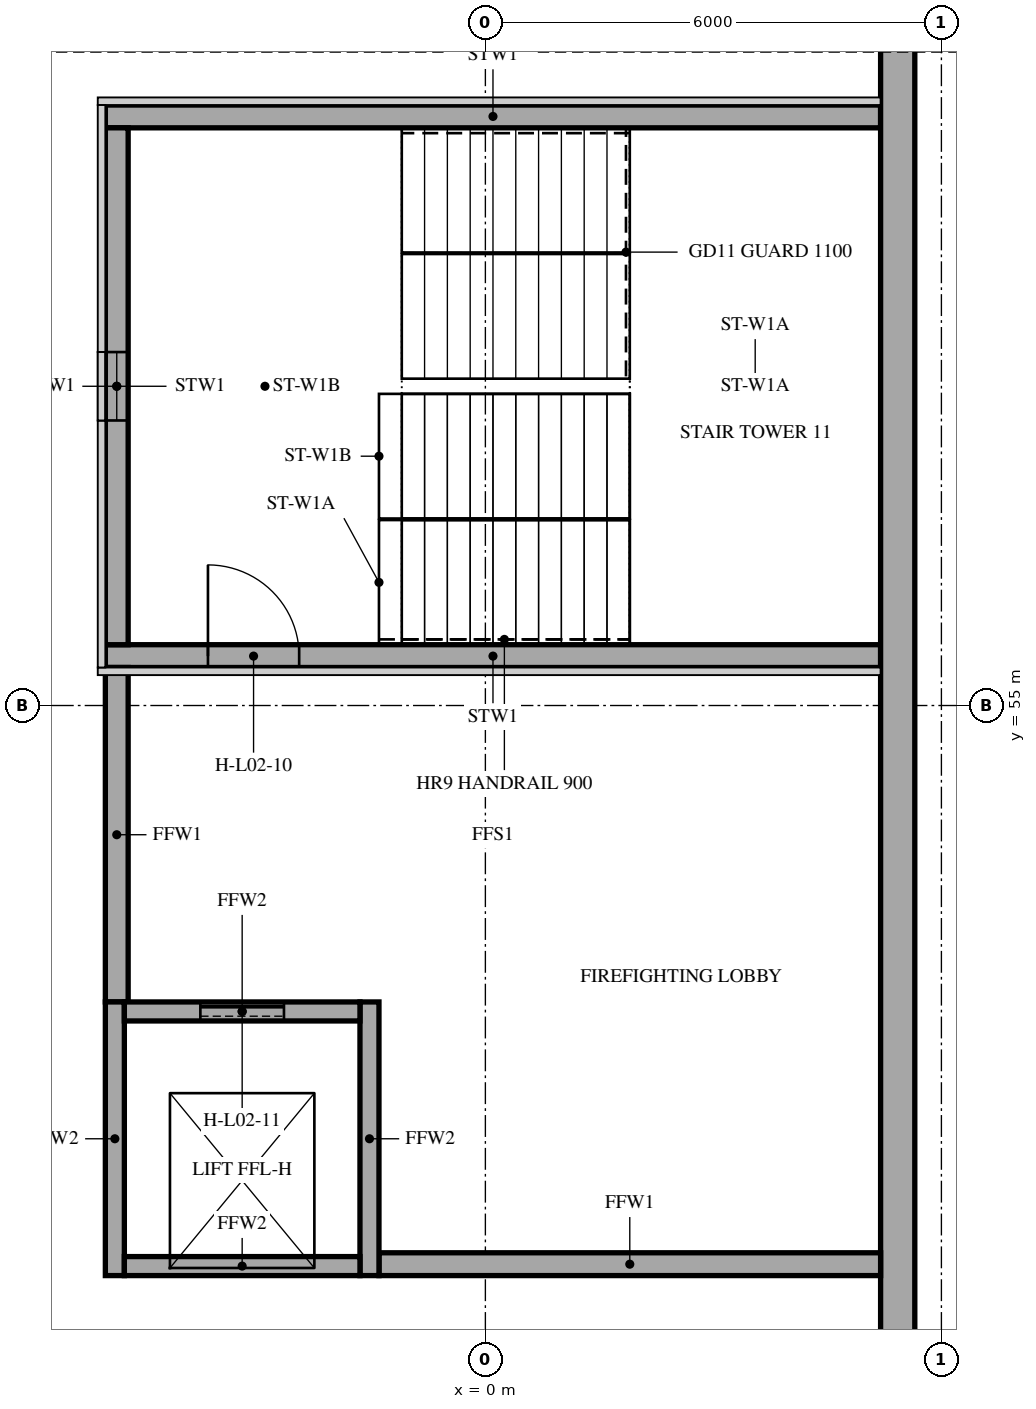
"""IFC4 building model, lengths in metres.
Left out: names, types, materials, properties, quantities, classifications, styles, units other than length and angle.
Written with IfcOpenShell. Run it as: python <this file> out.ifc"""

import sys

from ifc_helpers import new_model, si_unit, direction, frame, frame_2d, origin, place, context, subcontext, project, spatial, rectangle, extrude, element, fill, save


model = new_model("IFC4")
c1 = context("Model", 3, precision=1e-05, world=origin(), true_north=direction((0.0, 1.0)))
c2 = subcontext(c1, "Body", "Model", "MODEL_VIEW")
j1 = project(units=[si_unit("LENGTHUNIT", "METRE"), si_unit("PLANEANGLEUNIT", "RADIAN")], contexts=[c1])
p1 = place(None, origin())
s1 = spatial("IfcSite", under=j1, at=p1, CompositionType="ELEMENT")
p2 = place(p1, origin())
s2 = spatial("IfcBuilding", under=s1, at=p2, CompositionType="ELEMENT")
p3 = place(p2, frame((0.0, 0.0, 10.0)))
s3 = spatial("IfcBuildingStorey", under=s2, at=p3, CompositionType="ELEMENT", Elevation=10.0)
p4 = place(p3, frame((5.2, 55.65, 0.0), z_axis=(0.0, 0.0, 1.0), x_axis=(-1.0, 0.0, 0.0)))
e1 = element("IfcWall", 1, at=p4, inside=s3, PredefinedType="SHEAR", context=c2, shape_type="SweptSolid", body=[
    extrude(rectangle(XDim=10.2, YDim=0.3, at=frame_2d((5.1, 0.0))), origin(), (0.0, 0.0, 1.0), 5.0),
])
p5 = place(p4, frame((7.65, 0.0, 0.0)))
e2 = element("IfcOpeningElement", 2, at=p5, cuts=e1, PredefinedType="OPENING", context=c2, shape_type="SweptSolid", body=[
    extrude(rectangle(XDim=1.2, YDim=2.1, at=frame_2d((0.6, 1.05))), frame((0.0, 0.16, 0.0), z_axis=(0.0, -1.0, 0.0), x_axis=(1.0, 0.0, 0.0)), (0.0, 0.0, 1.0), 0.32),
])
p6 = place(p3, frame((5.2, 62.75, 0.0), z_axis=(0.0, 0.0, 1.0), x_axis=(-1.0, 0.0, 0.0)))
e3 = element("IfcWall", 3, at=p6, inside=s3, PredefinedType="SHEAR", context=c2, shape_type="SweptSolid", body=[
    extrude(rectangle(XDim=10.2, YDim=0.3, at=frame_2d((5.1, 0.0))), origin(), (0.0, 0.0, 1.0), 5.0),
])
p7 = place(p3, frame((-4.85, 55.8, 0.0), z_axis=(0.0, 0.0, 1.0), x_axis=(0.0, 1.0, 0.0)))
e4 = element("IfcWall", 4, at=p7, inside=s3, PredefinedType="SHEAR", context=c2, shape_type="SweptSolid", body=[
    extrude(rectangle(XDim=6.8, YDim=0.3, at=frame_2d((3.4, 0.0))), origin(), (0.0, 0.0, 1.0), 5.0),
])
p8 = place(p7, frame((2.95, 0.0, 0.9)))
e5 = element("IfcOpeningElement", 5, at=p8, cuts=e4, PredefinedType="OPENING", context=c2, shape_type="SweptSolid", body=[
    extrude(rectangle(XDim=0.9, YDim=1.5, at=frame_2d((0.45, 0.75))), frame((0.0, 0.16, 0.0), z_axis=(0.0, -1.0, 0.0), x_axis=(1.0, 0.0, 0.0)), (0.0, 0.0, 1.0), 0.32),
])
p9 = place(p3, frame((5.425, 46.75, 0.0), z_axis=(0.0, 0.0, 1.0), x_axis=(0.0, 1.0, 0.0)))
e6 = element("IfcWall", 6, at=p9, inside=s3, PredefinedType="SOLIDWALL", context=c2, shape_type="SweptSolid", body=[
    extrude(rectangle(XDim=61.65, YDim=0.45, at=frame_2d((30.825, 0.0))), origin(), (0.0, 0.0, 1.0), 5.0),
])
p10 = place(p9, frame((45.75, 0.0, 0.0)))
e7 = element("IfcOpeningElement", 7, at=p10, cuts=e6, PredefinedType="OPENING", context=c2, shape_type="SweptSolid", body=[
    extrude(rectangle(XDim=6.0, YDim=0.6, at=frame_2d((3.0, 0.3))), frame((0.0, 0.235, 0.0), z_axis=(0.0, -1.0, 0.0), x_axis=(1.0, 0.0, 0.0)), (0.0, 0.0, 1.0), 0.47),
])
p11 = place(p9, frame((54.75, 0.0, 0.0)))
e8 = element("IfcOpeningElement", 8, at=p11, cuts=e6, PredefinedType="OPENING", context=c2, shape_type="SweptSolid", body=[
    extrude(rectangle(XDim=6.0, YDim=0.6, at=frame_2d((3.0, 0.3))), frame((0.0, 0.235, 0.0), z_axis=(0.0, -1.0, 0.0), x_axis=(1.0, 0.0, 0.0)), (0.0, 0.0, 1.0), 0.47),
])
p12 = place(p3, frame((-4.85, 51.1, 0.0), z_axis=(0.0, 0.0, 1.0), x_axis=(0.0, 1.0, 0.0)))
e9 = element("IfcWall", 9, at=p12, inside=s3, PredefinedType="SHEAR", context=c2, shape_type="SweptSolid", body=[
    extrude(rectangle(XDim=4.4, YDim=0.3, at=frame_2d((2.2, 0.0))), origin(), (0.0, 0.0, 1.0), 4.75),
])
p13 = place(p3, frame((-1.4, 47.65, 0.0), z_axis=(0.0, 0.0, 1.0), x_axis=(1.0, 0.0, 0.0)))
e10 = element("IfcWall", 10, at=p13, inside=s3, PredefinedType="SHEAR", context=c2, shape_type="SweptSolid", body=[
    extrude(rectangle(XDim=6.6, YDim=0.3, at=frame_2d((3.3, 0.0))), origin(), (0.0, 0.0, 1.0), 4.75),
])
for number, where, z_axis, x_axis in (
    (11, (-4.875, 47.5, 0.0), (0.0, 0.0, 1.0), (0.0, 1.0, 0.0)),
    (12, (-1.525, 47.5, 0.0), (0.0, 0.0, 1.0), (0.0, 1.0, 0.0)),
):
    element("IfcWall", number, at=place(p3, frame(where, z_axis=z_axis, x_axis=x_axis)), inside=s3, PredefinedType="SHEAR", context=c2, shape_type="SweptSolid", body=[
        extrude(rectangle(XDim=3.6, YDim=0.25, at=frame_2d((1.8, 0.0))), origin(), (0.0, 0.0, 1.0), 5.0),
    ])
p14 = place(p3, frame((-4.75, 50.975, 0.0), z_axis=(0.0, 0.0, 1.0), x_axis=(1.0, 0.0, 0.0)))
e13 = element("IfcWall", 13, at=p14, inside=s3, PredefinedType="SHEAR", context=c2, shape_type="SweptSolid", body=[
    extrude(rectangle(XDim=3.1, YDim=0.25, at=frame_2d((1.55, 0.0))), origin(), (0.0, 0.0, 1.0), 5.0),
])
p15 = place(p14, frame((1.0, 0.0, 0.0)))
e14 = element("IfcOpeningElement", 14, at=p15, cuts=e13, PredefinedType="OPENING", context=c2, shape_type="SweptSolid", body=[
    extrude(rectangle(XDim=1.1, YDim=2.1, at=frame_2d((0.55, 1.05))), frame((0.0, 0.135, 0.0), z_axis=(0.0, -1.0, 0.0), x_axis=(1.0, 0.0, 0.0)), (0.0, 0.0, 1.0), 0.27),
])
p16 = place(p3, frame((-4.75, 47.625, 0.0), z_axis=(0.0, 0.0, 1.0), x_axis=(1.0, 0.0, 0.0)))
e15 = element("IfcWall", 15, at=p16, inside=s3, PredefinedType="SHEAR", context=c2, shape_type="SweptSolid", body=[
    extrude(rectangle(XDim=3.1, YDim=0.25, at=frame_2d((1.55, 0.0))), origin(), (0.0, 0.0, 1.0), 5.0),
])
p17 = place(p8, origin())
e16 = element("IfcWindow", 16, at=p17, inside=s3, PartitioningType="SINGLE_PANEL", PredefinedType="WINDOW", context=c2, shape_type="SweptSolid", body=[
    extrude(rectangle(XDim=0.9, YDim=1.5, at=frame_2d((0.45, 0.75))), frame((0.0, 0.03, 0.0), z_axis=(0.0, -1.0, 0.0), x_axis=(1.0, 0.0, 0.0)), (0.0, 0.0, 1.0), 0.06),
])
fill(e5, e16)
p18 = place(p5, frame((1.2, 0.0, 0.0), z_axis=(0.0, 0.0, 1.0), x_axis=(-1.0, 0.0, 0.0)))
e17 = element("IfcDoor", 17, at=p18, inside=s3, OperationType="SINGLE_SWING_LEFT", PredefinedType="DOOR", context=c2, shape_type="SweptSolid", body=[
    extrude(rectangle(XDim=1.2, YDim=2.1, at=frame_2d((0.6, 1.05))), frame((0.0, 0.025, 0.0), z_axis=(0.0, -1.0, 0.0), x_axis=(1.0, 0.0, 0.0)), (0.0, 0.0, 1.0), 0.05),
])
fill(e2, e17)
p19 = place(p15, origin())
e18 = element("IfcDoor", 18, at=p19, inside=s3, OperationType="SLIDING_TO_LEFT", PredefinedType="DOOR", context=c2, shape_type="SweptSolid", body=[
    extrude(rectangle(XDim=1.1, YDim=2.1, at=frame_2d((0.55, 1.05))), frame((0.0, 0.025, 0.0), z_axis=(0.0, -1.0, 0.0), x_axis=(1.0, 0.0, 0.0)), (0.0, 0.0, 1.0), 0.05),
])
fill(e14, e18)
save(model, sys.argv[1])
